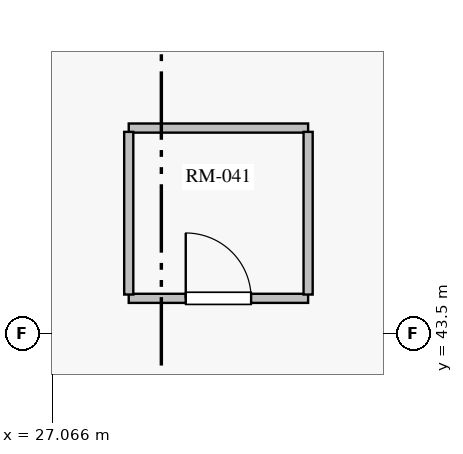
"""IFC4 building model, lengths in metres.
Left out: names, types, materials, properties, quantities, classifications, styles, units other than length and angle.
Written with IfcOpenShell. Run it as: python <this file> out.ifc"""

import sys

from ifc_helpers import new_model, si_unit, direction, frame, frame_2d, origin, origin_with_axes, place, context, subcontext, project, spatial, rectangle, extrude, source, transform, mapped, element, fill, save


model = new_model("IFC4")
c1 = context("Model", 3, precision=1e-05, world=origin(), true_north=direction((0.0, 1.0)))
c2 = subcontext(c1, "Body", "Model", "MODEL_VIEW")
j1 = project(units=[si_unit("LENGTHUNIT", "METRE"), si_unit("PLANEANGLEUNIT", "RADIAN")], contexts=[c1])
p1 = place(None, origin())
s1 = spatial("IfcSite", under=j1, at=p1, CompositionType="ELEMENT")
p2 = place(p1, origin())
s2 = spatial("IfcBuilding", under=s1, at=p2, CompositionType="ELEMENT")
p3 = place(p2, frame((0.0, 0.0, 226.05)))
s3 = spatial("IfcBuildingStorey", under=s2, at=p3, CompositionType="ELEMENT", Elevation=226.05)
p4 = place(p3, frame((38.464, 46.309, 0.0), z_axis=(0.0, 0.0, 1.0), x_axis=(-0.965830047026, 0.259176233983, 0.0)))
e1 = element("IfcWall", 1, at=p4, inside=s3, PredefinedType="SOLIDWALL", context=c2, shape_type="SweptSolid", body=[
    extrude(rectangle(XDim=9.555, YDim=0.28, at=frame_2d((4.778, 0.0))), origin(), (0.0, 0.0, 1.0), 2.85),
])
p5 = place(p4, frame((1.449, 0.0, 0.85)))
e2 = element("IfcOpeningElement", 2, at=p5, cuts=e1, PredefinedType="OPENING", context=c2, shape_type="SweptSolid", body=[
    extrude(rectangle(XDim=1.6, YDim=1.6, at=frame_2d((0.8, 0.8))), frame((0.0, 0.15, 0.0), z_axis=(0.0, -1.0, 0.0), x_axis=(1.0, 0.0, 0.0)), (0.0, 0.0, 1.0), 0.3),
])
p6 = place(p4, frame((6.167, 0.0, 0.85)))
e3 = element("IfcOpeningElement", 3, at=p6, cuts=e1, PredefinedType="OPENING", context=c2, shape_type="SweptSolid", body=[
    extrude(rectangle(XDim=1.6, YDim=1.6, at=frame_2d((0.8, 0.8))), frame((0.0, 0.15, 0.0), z_axis=(0.0, -1.0, 0.0), x_axis=(1.0, 0.0, 0.0)), (0.0, 0.0, 1.0), 0.3),
])
p7 = place(p3, frame((29.235, 48.786, 0.0), z_axis=(0.0, 0.0, 1.0), x_axis=(-0.936684055386, -0.350175642193, 0.0)))
e4 = element("IfcWall", 4, at=p7, inside=s3, PredefinedType="SOLIDWALL", context=c2, shape_type="SweptSolid", body=[
    extrude(rectangle(XDim=12.621, YDim=0.28, at=frame_2d((6.31, 0.0))), origin(), (0.0, 0.0, 1.0), 2.85),
])
p8 = place(p7, frame((1.557, 0.0, 0.85)))
e5 = element("IfcOpeningElement", 5, at=p8, cuts=e4, PredefinedType="OPENING", context=c2, shape_type="SweptSolid", body=[
    extrude(rectangle(XDim=1.6, YDim=1.6, at=frame_2d((0.8, 0.8))), frame((0.0, 0.15, 0.0), z_axis=(0.0, -1.0, 0.0), x_axis=(1.0, 0.0, 0.0)), (0.0, 0.0, 1.0), 0.3),
])
p9 = place(p7, frame((5.51, 0.0, 0.85)))
e6 = element("IfcOpeningElement", 6, at=p9, cuts=e4, PredefinedType="OPENING", context=c2, shape_type="SweptSolid", body=[
    extrude(rectangle(XDim=1.6, YDim=1.6, at=frame_2d((0.8, 0.8))), frame((0.0, 0.15, 0.0), z_axis=(0.0, -1.0, 0.0), x_axis=(1.0, 0.0, 0.0)), (0.0, 0.0, 1.0), 0.3),
])
p10 = place(p7, frame((9.464, 0.0, 0.85)))
e7 = element("IfcOpeningElement", 7, at=p10, cuts=e4, PredefinedType="OPENING", context=c2, shape_type="SweptSolid", body=[
    extrude(rectangle(XDim=1.6, YDim=1.6, at=frame_2d((0.8, 0.8))), frame((0.0, 0.15, 0.0), z_axis=(0.0, -1.0, 0.0), x_axis=(1.0, 0.0, 0.0)), (0.0, 0.0, 1.0), 0.3),
])
p11 = place(p3, frame((31.207, 36.371, 0.0), z_axis=(0.0, 0.0, 1.0), x_axis=(0.258815277627, 0.965926835773, 0.0)))
e8 = element("IfcWall", 8, at=p11, inside=s3, PredefinedType="PARTITIONING", context=c2, shape_type="SweptSolid", body=[
    extrude(rectangle(XDim=11.455, YDim=0.16, at=frame_2d((5.727, 0.0))), origin(), (0.0, 0.0, 1.0), 2.85),
])
p12 = place(p3, frame((28.071, 43.964, 0.0), z_axis=(0.0, 0.0, 1.0), x_axis=(1.0, 0.0, 0.0)))
e9 = element("IfcWall", 9, at=p12, inside=s3, PredefinedType="PARTITIONING", context=c2, shape_type="SweptSolid", body=[
    extrude(rectangle(XDim=2.36, YDim=0.12, at=frame_2d((1.18, 0.0))), origin(), (0.0, 0.0, 1.0), 2.85),
])
p13 = place(p12, frame((0.75, 0.0, 0.0)))
e10 = element("IfcOpeningElement", 10, at=p13, cuts=e9, PredefinedType="OPENING", context=c2, shape_type="SweptSolid", body=[
    extrude(rectangle(XDim=0.86, YDim=2.1, at=frame_2d((0.43, 1.05))), frame((0.0, 0.07, 0.0), z_axis=(0.0, -1.0, 0.0), x_axis=(1.0, 0.0, 0.0)), (0.0, 0.0, 1.0), 0.14),
])
p14 = place(p3, frame((30.431, 46.204, 0.0), z_axis=(0.0, 0.0, 1.0), x_axis=(-1.0, 0.0, 0.0)))
e11 = element("IfcWall", 11, at=p14, inside=s3, PredefinedType="PARTITIONING", context=c2, shape_type="SweptSolid", body=[
    extrude(rectangle(XDim=2.36, YDim=0.12, at=frame_2d((1.18, 0.0))), origin(), (0.0, 0.0, 1.0), 2.85),
])
for number, where, z_axis, x_axis in (
    (12, (30.431, 44.014, 0.0), (0.0, 0.0, 1.0), (0.0, 1.0, 0.0)),
    (13, (28.071, 46.154, 0.0), (0.0, 0.0, 1.0), (0.0, -1.0, 0.0)),
):
    element("IfcWall", number, at=place(p3, frame(where, z_axis=z_axis, x_axis=x_axis)), inside=s3, PredefinedType="PARTITIONING", context=c2, shape_type="SweptSolid", body=[
        extrude(rectangle(XDim=2.14, YDim=0.12, at=frame_2d((1.07, 0.0))), origin(), (0.0, 0.0, 1.0), 2.85),
    ])
m1 = source(origin_with_axes(), c2, "Body", "SweptSolid", [
    extrude(rectangle(XDim=0.86, YDim=2.1, at=frame_2d((0.43, 1.05))), frame((0.0, 0.025, 0.0), z_axis=(0.0, -1.0, 0.0), x_axis=(1.0, 0.0, 0.0)), (0.0, 0.0, 1.0), 0.05),
])
p15 = place(p13, origin())
e14 = element("IfcDoor", 14, at=p15, inside=s3, OperationType="SINGLE_SWING_LEFT", PredefinedType="DOOR", context=c2, shape_type="MappedRepresentation", body=[
    mapped(m1, transform((0.0, 0.0, 0.0), scale=1.0)),
])
fill(e10, e14)
save(model, sys.argv[1])
